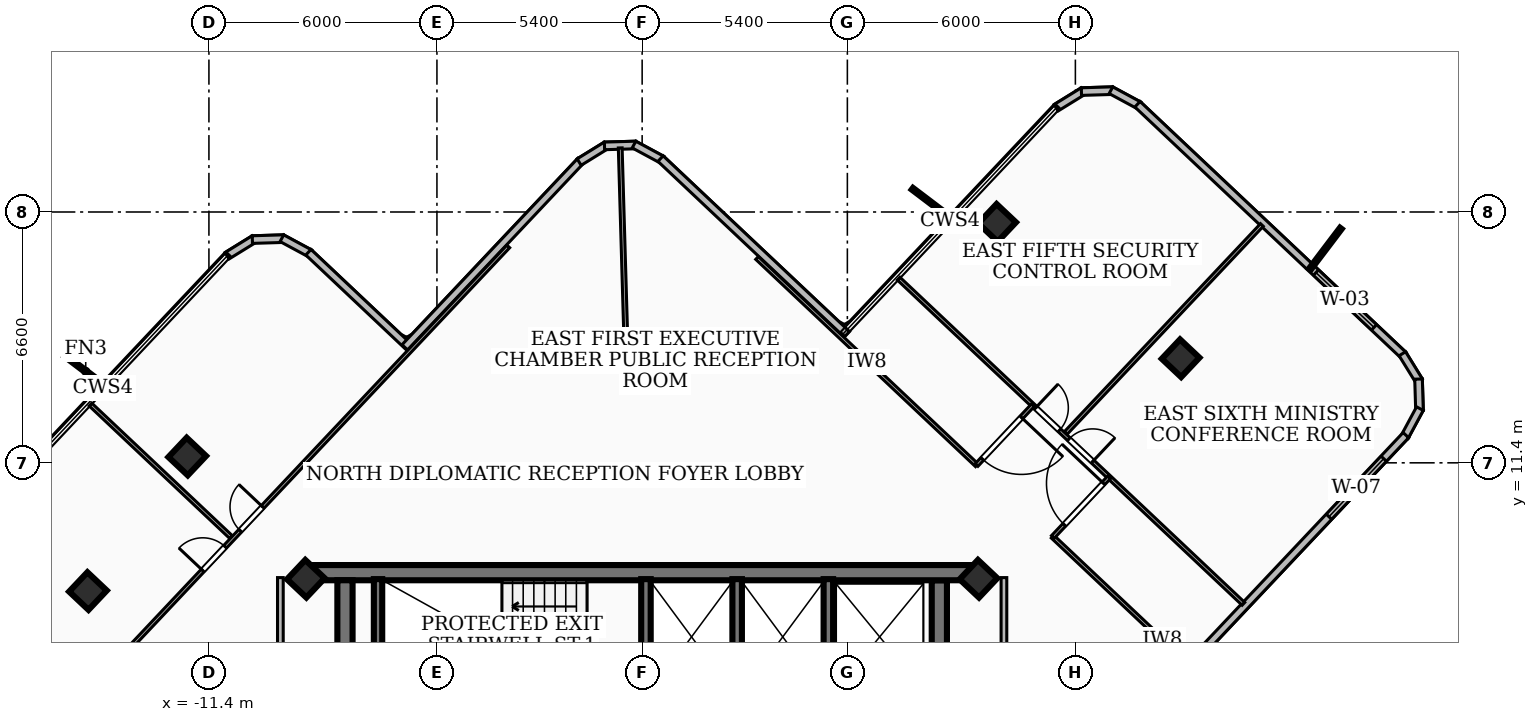
"""IFC4 building model, lengths in metres.
Left out: names, types, materials, properties, quantities, classifications, styles, units other than length and angle.
Written with IfcOpenShell. Run it as: python <this file> out.ifc"""

import sys

from ifc_helpers import new_model, si_unit, direction, frame, frame_2d, origin, origin_2d, place, context, subcontext, project, spatial, rectangle, extrude, element, fill, save


model = new_model("IFC4")
c1 = context("Model", 3, precision=1e-05, world=origin(), true_north=direction((0.0, 1.0)))
c2 = subcontext(c1, "Body", "Model", "MODEL_VIEW")
j1 = project(units=[si_unit("LENGTHUNIT", "METRE"), si_unit("PLANEANGLEUNIT", "RADIAN")], contexts=[c1])
p1 = place(None, origin())
s1 = spatial("IfcSite", under=j1, at=p1, CompositionType="ELEMENT")
p2 = place(p1, origin())
s2 = spatial("IfcBuilding", under=s1, at=p2, CompositionType="ELEMENT")
p3 = place(p2, frame((0.0, 0.0, 247.5)))
s3 = spatial("IfcBuildingStorey", under=s2, at=p3, CompositionType="ELEMENT", Elevation=247.5)
p4 = place(p3, frame((-8.78, 8.51, 0.0), z_axis=(0.0, 0.0, 1.0), x_axis=(1.0, 0.0, 0.0)))
e1 = element("IfcWall", 1, at=p4, inside=s3, PredefinedType="SHEAR", context=c2, shape_type="SweptSolid", body=[
    extrude(rectangle(XDim=17.56, YDim=0.4, at=frame_2d((8.78, 0.0))), origin(), (0.0, 0.0, 1.0), 3.16),
])
for number, where, z_axis, x_axis in (
    (2, (-7.82, 1.95, 0.0), (0.0, 0.0, 1.0), (0.0, 1.0, 0.0)),
    (3, (7.82, 8.31, 0.0), (0.0, 0.0, 1.0), (0.0, -1.0, 0.0)),
):
    element("IfcWall", number, at=place(p3, frame(where, z_axis=z_axis, x_axis=x_axis)), inside=s3, PredefinedType="SHEAR", context=c2, shape_type="SweptSolid", body=[
        extrude(rectangle(XDim=6.36, YDim=0.4, at=frame_2d((3.18, 0.0))), origin(), (0.0, 0.0, 1.0), 3.16),
    ])
p5 = place(p3, frame((-6.95, 5.28, 0.0), z_axis=(0.0, 0.0, 1.0), x_axis=(0.0, 1.0, 0.0)))
e4 = element("IfcWall", 4, at=p5, inside=s3, PredefinedType="SOLIDWALL", context=c2, shape_type="SweptSolid", body=[
    extrude(rectangle(XDim=3.06, YDim=0.22, at=frame_2d((1.53, 0.0))), origin(), (0.0, 0.0, 1.0), 3.16),
])
for number, where, z_axis, x_axis in (
    (5, (0.1, 5.3, 0.0), (0.0, 0.0, 1.0), (0.0, 1.0, 0.0)),
    (6, (2.5, 5.3, 0.0), (0.0, 0.0, 1.0), (0.0, 1.0, 0.0)),
    (7, (4.9, 5.3, 0.0), (0.0, 0.0, 1.0), (0.0, 1.0, 0.0)),
):
    element("IfcWall", number, at=place(p3, frame(where, z_axis=z_axis, x_axis=x_axis)), inside=s3, PredefinedType="SOLIDWALL", context=c2, shape_type="SweptSolid", body=[
        extrude(rectangle(XDim=3.04, YDim=0.25, at=frame_2d((1.52, 0.0))), origin(), (0.0, 0.0, 1.0), 3.16),
    ])
for number, where, z_axis, x_axis in (
    (8, (-8.85, 8.35, 0.0), (0.0, 0.0, 1.0), (0.686, 0.728, 0.0)),
    (9, (8.85, 8.35, 0.0), (0.0, 0.0, 1.0), (0.686, 0.728, 0.0)),
    (10, (14.169, 14.152, 0.0), (0.0, 0.0, 1.0), (0.686, 0.728, 0.0)),
    (11, (9.341, 17.714, 0.0), (0.0, 0.0, 1.0), (0.686, 0.728, 0.0)),
    (12, (-11.971, 11.566, 0.0), (0.0, 0.0, 1.0), (0.686, 0.728, 0.0)),
    (13, (-14.583, 8.026, 0.0), (0.0, 0.0, 1.0), (0.686, 0.728, 0.0)),
):
    element("IfcColumn", number, at=place(p3, frame(where, z_axis=z_axis, x_axis=x_axis)), inside=s3, PredefinedType="COLUMN", context=c2, shape_type="SweptSolid", body=[
        extrude(rectangle(XDim=0.7, YDim=0.7, at=origin_2d()), origin(), (0.0, 0.0, 1.0), 3.42),
    ])
p6 = place(p3, frame((-14.778, 5.275, 0.0), z_axis=(0.0, 0.0, 1.0), x_axis=(-0.727262285553, 0.686359649172, 0.0)))
e14 = element("IfcWall", 14, at=p6, inside=s3, PredefinedType="SOLIDWALL", context=c2, shape_type="SweptSolid", body=[
    extrude(rectangle(XDim=3.641, YDim=0.2, at=frame_2d((1.82, 0.0))), origin(), (0.0, 0.0, 1.0), 3.16),
])
p7 = place(p3, frame((-10.924, 16.848, 0.0), z_axis=(0.0, 0.0, 1.0), x_axis=(0.850947362812, 0.525250974033, 0.0)))
e15 = element("IfcWall", 15, at=p7, inside=s3, PredefinedType="SOLIDWALL", context=c2, shape_type="SweptSolid", body=[
    extrude(rectangle(XDim=0.838, YDim=0.2, at=frame_2d((0.419, 0.0))), origin(), (0.0, 0.0, 1.0), 3.16),
])
p8 = place(p3, frame((-10.257, 17.274, 0.0), z_axis=(0.0, 0.0, 1.0), x_axis=(0.999534635062, 0.03050431627, 0.0)))
e16 = element("IfcWall", 16, at=p8, inside=s3, PredefinedType="SOLIDWALL", context=c2, shape_type="SweptSolid", body=[
    extrude(rectangle(XDim=0.824, YDim=0.2, at=frame_2d((0.412, 0.0))), origin(), (0.0, 0.0, 1.0), 3.16),
])
p9 = place(p3, frame((-9.48, 17.31, 0.0), z_axis=(0.0, 0.0, 1.0), x_axis=(0.880199822755, -0.474603278561, 0.0)))
e17 = element("IfcWall", 17, at=p9, inside=s3, PredefinedType="SOLIDWALL", context=c2, shape_type="SweptSolid", body=[
    extrude(rectangle(XDim=0.838, YDim=0.2, at=frame_2d((0.419, 0.0))), origin(), (0.0, 0.0, 1.0), 3.16),
])
p10 = place(p3, frame((-8.782, 16.941, 0.0), z_axis=(0.0, 0.0, 1.0), x_axis=(0.727388601412, -0.686225781019, 0.0)))
e18 = element("IfcWall", 18, at=p10, inside=s3, PredefinedType="SOLIDWALL", context=c2, shape_type="SweptSolid", body=[
    extrude(rectangle(XDim=3.642, YDim=0.2, at=frame_2d((1.821, 0.0))), origin(), (0.0, 0.0, 1.0), 3.16),
])
p11 = place(p3, frame((-6.246, 14.439, 0.0), z_axis=(0.0, 0.0, 1.0), x_axis=(0.686109803758, 0.727497998064, 0.0)))
e19 = element("IfcWall", 19, at=p11, inside=s3, PredefinedType="SOLIDWALL", context=c2, shape_type="SweptSolid", body=[
    extrude(rectangle(XDim=6.742, YDim=0.2, at=frame_2d((3.371, 0.0))), origin(), (0.0, 0.0, 1.0), 3.16),
])
p12 = place(p3, frame((-1.658, 19.313, 0.0), z_axis=(0.0, 0.0, 1.0), x_axis=(0.850997215859, 0.52517019965, 0.0)))
e20 = element("IfcWall", 20, at=p12, inside=s3, PredefinedType="SOLIDWALL", context=c2, shape_type="SweptSolid", body=[
    extrude(rectangle(XDim=0.838, YDim=0.2, at=frame_2d((0.419, 0.0))), origin(), (0.0, 0.0, 1.0), 3.16),
])
p13 = place(p3, frame((-0.991, 19.739, 0.0), z_axis=(0.0, 0.0, 1.0), x_axis=(0.999578691641, 0.029024803491, 0.0)))
e21 = element("IfcWall", 21, at=p13, inside=s3, PredefinedType="SOLIDWALL", context=c2, shape_type="SweptSolid", body=[
    extrude(rectangle(XDim=0.824, YDim=0.2, at=frame_2d((0.412, 0.0))), origin(), (0.0, 0.0, 1.0), 3.16),
])
p14 = place(p3, frame((-0.214, 19.774, 0.0), z_axis=(0.0, 0.0, 1.0), x_axis=(0.880199822755, -0.474603278561, 0.0)))
e22 = element("IfcWall", 22, at=p14, inside=s3, PredefinedType="SOLIDWALL", context=c2, shape_type="SweptSolid", body=[
    extrude(rectangle(XDim=0.838, YDim=0.2, at=frame_2d((0.419, 0.0))), origin(), (0.0, 0.0, 1.0), 3.16),
])
p15 = place(p3, frame((0.484, 19.405, 0.0), z_axis=(0.0, 0.0, 1.0), x_axis=(0.727574426042, -0.686028756372, 0.0)))
e23 = element("IfcWall", 23, at=p15, inside=s3, PredefinedType="SOLIDWALL", context=c2, shape_type="SweptSolid", body=[
    extrude(rectangle(XDim=6.74, YDim=0.2, at=frame_2d((3.37, 0.0))), origin(), (0.0, 0.0, 1.0), 3.16),
])
p16 = place(p3, frame((10.892, 20.742, 0.0), z_axis=(0.0, 0.0, 1.0), x_axis=(0.850997215859, 0.52517019965, 0.0)))
e24 = element("IfcWall", 24, at=p16, inside=s3, PredefinedType="SOLIDWALL", context=c2, shape_type="SweptSolid", body=[
    extrude(rectangle(XDim=0.838, YDim=0.2, at=frame_2d((0.419, 0.0))), origin(), (0.0, 0.0, 1.0), 3.16),
])
p17 = place(p3, frame((11.559, 21.168, 0.0), z_axis=(0.0, 0.0, 1.0), x_axis=(0.999534635062, 0.03050431627, 0.0)))
e25 = element("IfcWall", 25, at=p17, inside=s3, PredefinedType="SOLIDWALL", context=c2, shape_type="SweptSolid", body=[
    extrude(rectangle(XDim=0.824, YDim=0.2, at=frame_2d((0.412, 0.0))), origin(), (0.0, 0.0, 1.0), 3.16),
])
p18 = place(p3, frame((12.336, 21.204, 0.0), z_axis=(0.0, 0.0, 1.0), x_axis=(0.880078176624, -0.474828814447, 0.0)))
e26 = element("IfcWall", 26, at=p18, inside=s3, PredefinedType="SOLIDWALL", context=c2, shape_type="SweptSolid", body=[
    extrude(rectangle(XDim=0.839, YDim=0.2, at=frame_2d((0.419, 0.0))), origin(), (0.0, 0.0, 1.0), 3.16),
])
p19 = place(p3, frame((13.034, 20.835, 0.0), z_axis=(0.0, 0.0, 1.0), x_axis=(0.727480137234, -0.686128741513, 0.0)))
e27 = element("IfcWall", 27, at=p19, inside=s3, PredefinedType="SOLIDWALL", context=c2, shape_type="SweptSolid", body=[
    extrude(rectangle(XDim=9.624, YDim=0.2, at=frame_2d((4.812, 0.0))), origin(), (0.0, 0.0, 1.0), 3.16),
])
p20 = place(p19, frame((6.456, 0.0, 0.85)))
e28 = element("IfcOpeningElement", 28, at=p20, cuts=e27, PredefinedType="OPENING", context=c2, shape_type="SweptSolid", body=[
    extrude(rectangle(XDim=2.1, YDim=2.0, at=frame_2d((1.05, 1.0))), frame((0.0, 0.11, 0.0), z_axis=(0.0, -1.0, 0.0), x_axis=(1.0, 0.0, 0.0)), (0.0, 0.0, 1.0), 0.22),
])
p21 = place(p3, frame((20.004, 14.27, 0.0), z_axis=(0.0, 0.0, 1.0), x_axis=(0.525902672248, -0.85054475445, 0.0)))
e29 = element("IfcWall", 29, at=p21, inside=s3, PredefinedType="SOLIDWALL", context=c2, shape_type="SweptSolid", body=[
    extrude(rectangle(XDim=0.837, YDim=0.2, at=frame_2d((0.418, 0.0))), origin(), (0.0, 0.0, 1.0), 3.16),
])
p22 = place(p3, frame((20.43, 13.604, 0.0), z_axis=(0.0, 0.0, 1.0), x_axis=(0.030468239346, -0.999535735425, 0.0)))
e30 = element("IfcWall", 30, at=p22, inside=s3, PredefinedType="SOLIDWALL", context=c2, shape_type="SweptSolid", body=[
    extrude(rectangle(XDim=0.825, YDim=0.2, at=frame_2d((0.413, 0.0))), origin(), (0.0, 0.0, 1.0), 3.16),
])
p23 = place(p3, frame((20.466, 12.826, 0.0), z_axis=(0.0, 0.0, 1.0), x_axis=(-0.474603278561, -0.880199822755, 0.0)))
e31 = element("IfcWall", 31, at=p23, inside=s3, PredefinedType="SOLIDWALL", context=c2, shape_type="SweptSolid", body=[
    extrude(rectangle(XDim=0.838, YDim=0.2, at=frame_2d((0.419, 0.0))), origin(), (0.0, 0.0, 1.0), 3.16),
])
p24 = place(p3, frame((20.097, 12.128, 0.0), z_axis=(0.0, 0.0, 1.0), x_axis=(-0.686187598971, -0.72742462085, 0.0)))
e32 = element("IfcWall", 32, at=p24, inside=s3, PredefinedType="SOLIDWALL", context=c2, shape_type="SweptSolid", body=[
    extrude(rectangle(XDim=8.241, YDim=0.2, at=frame_2d((4.121, 0.0))), origin(), (0.0, 0.0, 1.0), 3.16),
])
p25 = place(p24, frame((0.85, 0.0, 0.85)))
e33 = element("IfcOpeningElement", 33, at=p25, cuts=e32, PredefinedType="OPENING", context=c2, shape_type="SweptSolid", body=[
    extrude(rectangle(XDim=2.1, YDim=1.8, at=frame_2d((1.05, 0.9))), frame((0.0, 0.11, 0.0), z_axis=(0.0, -1.0, 0.0), x_axis=(1.0, 0.0, 0.0)), (0.0, 0.0, 1.0), 0.22),
])
p26 = place(p3, frame((-9.52, 1.75, 0.0), z_axis=(0.0, 0.0, 1.0), x_axis=(0.0, 1.0, 0.0)))
e34 = element("IfcWall", 34, at=p26, inside=s3, PredefinedType="PARTITIONING", context=c2, shape_type="SweptSolid", body=[
    extrude(rectangle(XDim=6.63, YDim=0.15, at=frame_2d((3.315, 0.0))), origin(), (0.0, 0.0, 1.0), 2.53),
])
p27 = place(p3, frame((9.52, 1.75, 0.0), z_axis=(0.0, 0.0, 1.0), x_axis=(0.0, 1.0, 0.0)))
e35 = element("IfcWall", 35, at=p27, inside=s3, PredefinedType="PARTITIONING", context=c2, shape_type="SweptSolid", body=[
    extrude(rectangle(XDim=6.63, YDim=0.15, at=frame_2d((3.315, 0.0))), origin(), (0.0, 0.0, 1.0), 3.16),
])
p28 = place(p3, frame((-0.397, 13.54, 0.0), z_axis=(0.0, 0.0, 1.0), x_axis=(-0.029263699144, 0.999571726247, 0.0)))
e36 = element("IfcWall", 36, at=p28, inside=s3, PredefinedType="PARTITIONING", context=c2, shape_type="SweptSolid", body=[
    extrude(rectangle(XDim=6.149, YDim=0.1, at=frame_2d((3.074, 0.0))), origin(), (0.0, 0.0, 1.0), 3.16),
])
p29 = place(p3, frame((8.807, 11.336, 0.0), z_axis=(0.0, 0.0, 1.0), x_axis=(-0.727546923281, 0.68605792352, 0.0)))
e37 = element("IfcWall", 37, at=p29, inside=s3, PredefinedType="PARTITIONING", context=c2, shape_type="SweptSolid", body=[
    extrude(rectangle(XDim=7.95, YDim=0.1, at=frame_2d((3.975, 0.0))), origin(), (0.0, 0.0, 1.0), 3.16),
])
p30 = place(p3, frame((16.585, 4.002, 0.0), z_axis=(0.0, 0.0, 1.0), x_axis=(-0.727485611578, 0.686122937196, 0.0)))
e38 = element("IfcWall", 38, at=p30, inside=s3, PredefinedType="PARTITIONING", context=c2, shape_type="SweptSolid", body=[
    extrude(rectangle(XDim=7.951, YDim=0.1, at=frame_2d((3.975, 0.0))), origin(), (0.0, 0.0, 1.0), 3.16),
])
p31 = place(p3, frame((10.282, 12.915, 0.0), z_axis=(0.0, 0.0, 1.0), x_axis=(-0.685949623464, -0.727649032205, 0.0)))
e39 = element("IfcWall", 39, at=p31, inside=s3, PredefinedType="PARTITIONING", context=c2, shape_type="SweptSolid", body=[
    extrude(rectangle(XDim=2.16, YDim=0.1, at=frame_2d((1.08, 0.0))), origin(), (0.0, 0.0, 1.0), 2.53),
])
p32 = place(p31, frame((0.44, 0.0, 0.0)))
e40 = element("IfcOpeningElement", 40, at=p32, cuts=e39, PredefinedType="OPENING", context=c2, shape_type="SweptSolid", body=[
    extrude(rectangle(XDim=1.5, YDim=2.12, at=frame_2d((0.75, 1.06))), frame((0.0, 0.06, 0.0), z_axis=(0.0, -1.0, 0.0), x_axis=(1.0, 0.0, 0.0)), (0.0, 0.0, 1.0), 0.12),
])
p33 = place(p3, frame((10.808, 9.45, 0.0), z_axis=(0.0, 0.0, 1.0), x_axis=(0.686175284747, 0.727436236795, 0.0)))
e41 = element("IfcWall", 41, at=p33, inside=s3, PredefinedType="PARTITIONING", context=c2, shape_type="SweptSolid", body=[
    extrude(rectangle(XDim=2.16, YDim=0.1, at=frame_2d((1.08, 0.0))), origin(), (0.0, 0.0, 1.0), 3.16),
])
p34 = place(p33, frame((0.44, 0.0, 0.0)))
e42 = element("IfcOpeningElement", 42, at=p34, cuts=e41, PredefinedType="OPENING", context=c2, shape_type="SweptSolid", body=[
    extrude(rectangle(XDim=1.5, YDim=2.12, at=frame_2d((0.75, 1.06))), frame((0.0, 0.06, 0.0), z_axis=(0.0, -1.0, 0.0), x_axis=(1.0, 0.0, 0.0)), (0.0, 0.0, 1.0), 0.12),
])
p35 = place(p3, frame((11.145, 12.183, 0.0), z_axis=(0.0, 0.0, 1.0), x_axis=(0.686088923395, 0.727517689953, 0.0)))
e43 = element("IfcWall", 43, at=p35, inside=s3, PredefinedType="PARTITIONING", context=c2, shape_type="SweptSolid", body=[
    extrude(rectangle(XDim=7.525, YDim=0.1, at=frame_2d((3.763, 0.0))), origin(), (0.0, 0.0, 1.0), 3.16),
])
p36 = place(p3, frame((6.75, 16.246, 0.0), z_axis=(0.0, 0.0, 1.0), x_axis=(0.727488049341, -0.686120352464, 0.0)))
e44 = element("IfcWall", 44, at=p36, inside=s3, PredefinedType="PARTITIONING", context=c2, shape_type="SweptSolid", body=[
    extrude(rectangle(XDim=12.47, YDim=0.1, at=frame_2d((6.235, 0.0))), origin(), (0.0, 0.0, 1.0), 2.53),
])
p37 = place(p36, frame((6.155, 0.0, 0.0)))
e45 = element("IfcOpeningElement", 45, at=p37, cuts=e44, PredefinedType="OPENING", context=c2, shape_type="SweptSolid", body=[
    extrude(rectangle(XDim=0.86, YDim=2.04, at=frame_2d((0.43, 1.02))), frame((0.0, 0.06, 0.0), z_axis=(0.0, -1.0, 0.0), x_axis=(1.0, 0.0, 0.0)), (0.0, 0.0, 1.0), 0.12),
])
p38 = place(p36, frame((4.955, 0.0, 0.0)))
e46 = element("IfcOpeningElement", 46, at=p38, cuts=e44, PredefinedType="OPENING", context=c2, shape_type="SweptSolid", body=[
    extrude(rectangle(XDim=0.86, YDim=2.04, at=frame_2d((0.43, 1.02))), frame((0.0, 0.06, 0.0), z_axis=(0.0, -1.0, 0.0), x_axis=(1.0, 0.0, 0.0)), (0.0, 0.0, 1.0), 0.12),
])
p39 = place(p3, frame((-10.817, 9.445, 0.0), z_axis=(0.0, 0.0, 1.0), x_axis=(-0.727564075469, 0.686039733606, 0.0)))
e47 = element("IfcWall", 47, at=p39, inside=s3, PredefinedType="PARTITIONING", context=c2, shape_type="SweptSolid", body=[
    extrude(rectangle(XDim=5.086, YDim=0.1, at=frame_2d((2.543, 0.0))), origin(), (0.0, 0.0, 1.0), 3.16),
])
p40 = place(p3, frame((-17.271, 2.514, 0.0), z_axis=(0.0, 0.0, 1.0), x_axis=(0.686068145865, 0.727537283739, 0.0)))
e48 = element("IfcWall", 48, at=p40, inside=s3, PredefinedType="PARTITIONING", context=c2, shape_type="SweptSolid", body=[
    extrude(rectangle(XDim=20.04, YDim=0.1, at=frame_2d((10.02, 0.0))), origin(), (0.0, 0.0, 1.0), 2.53),
])
p41 = place(p40, frame((9.76, 0.0, 0.0)))
e49 = element("IfcOpeningElement", 49, at=p41, cuts=e48, PredefinedType="OPENING", context=c2, shape_type="SweptSolid", body=[
    extrude(rectangle(XDim=0.86, YDim=2.04, at=frame_2d((0.43, 1.02))), frame((0.0, 0.06, 0.0), z_axis=(0.0, -1.0, 0.0), x_axis=(1.0, 0.0, 0.0)), (0.0, 0.0, 1.0), 0.12),
])
p42 = place(p40, frame((8.32, 0.0, 0.0)))
e50 = element("IfcOpeningElement", 50, at=p42, cuts=e48, PredefinedType="OPENING", context=c2, shape_type="SweptSolid", body=[
    extrude(rectangle(XDim=0.86, YDim=2.04, at=frame_2d((0.43, 1.02))), frame((0.0, 0.06, 0.0), z_axis=(0.0, -1.0, 0.0), x_axis=(1.0, 0.0, 0.0)), (0.0, 0.0, 1.0), 0.12),
])
p43 = place(p20, origin())
e51 = element("IfcWindow", 51, at=p43, inside=s3, PartitioningType="SINGLE_PANEL", PredefinedType="WINDOW", context=c2, shape_type="SweptSolid", body=[
    extrude(rectangle(XDim=2.1, YDim=2.0, at=frame_2d((1.05, 1.0))), frame((0.0, 0.03, 0.0), z_axis=(0.0, -1.0, 0.0), x_axis=(1.0, 0.0, 0.0)), (0.0, 0.0, 1.0), 0.06),
])
fill(e28, e51)
p44 = place(p25, origin())
e52 = element("IfcWindow", 52, at=p44, inside=s3, PartitioningType="SINGLE_PANEL", PredefinedType="WINDOW", context=c2, shape_type="SweptSolid", body=[
    extrude(rectangle(XDim=2.1, YDim=1.8, at=frame_2d((1.05, 0.9))), frame((0.0, 0.03, 0.0), z_axis=(0.0, -1.0, 0.0), x_axis=(1.0, 0.0, 0.0)), (0.0, 0.0, 1.0), 0.06),
])
fill(e33, e52)
p45 = place(p32, origin())
e53 = element("IfcDoor", 53, at=p45, inside=s3, OperationType="SINGLE_SWING_LEFT", PredefinedType="DOOR", context=c2, shape_type="SweptSolid", body=[
    extrude(rectangle(XDim=1.5, YDim=2.12, at=frame_2d((0.75, 1.06))), frame((0.0, 0.025, 0.0), z_axis=(0.0, -1.0, 0.0), x_axis=(1.0, 0.0, 0.0)), (0.0, 0.0, 1.0), 0.05),
])
fill(e40, e53)
p46 = place(p34, origin())
e54 = element("IfcDoor", 54, at=p46, inside=s3, OperationType="SINGLE_SWING_RIGHT", PredefinedType="DOOR", context=c2, shape_type="SweptSolid", body=[
    extrude(rectangle(XDim=1.5, YDim=2.12, at=frame_2d((0.75, 1.06))), frame((0.0, 0.025, 0.0), z_axis=(0.0, -1.0, 0.0), x_axis=(1.0, 0.0, 0.0)), (0.0, 0.0, 1.0), 0.05),
])
fill(e42, e54)
p47 = place(p37, origin())
e55 = element("IfcDoor", 55, at=p47, inside=s3, OperationType="SINGLE_SWING_RIGHT", PredefinedType="DOOR", context=c2, shape_type="SweptSolid", body=[
    extrude(rectangle(XDim=0.86, YDim=2.04, at=frame_2d((0.43, 1.02))), frame((0.0, 0.025, 0.0), z_axis=(0.0, -1.0, 0.0), x_axis=(1.0, 0.0, 0.0)), (0.0, 0.0, 1.0), 0.05),
])
fill(e45, e55)
p48 = place(p38, origin())
e56 = element("IfcDoor", 56, at=p48, inside=s3, OperationType="SINGLE_SWING_LEFT", PredefinedType="DOOR", context=c2, shape_type="SweptSolid", body=[
    extrude(rectangle(XDim=0.86, YDim=2.04, at=frame_2d((0.43, 1.02))), frame((0.0, 0.025, 0.0), z_axis=(0.0, -1.0, 0.0), x_axis=(1.0, 0.0, 0.0)), (0.0, 0.0, 1.0), 0.05),
])
fill(e46, e56)
p49 = place(p41, origin())
e57 = element("IfcDoor", 57, at=p49, inside=s3, OperationType="SINGLE_SWING_RIGHT", PredefinedType="DOOR", context=c2, shape_type="SweptSolid", body=[
    extrude(rectangle(XDim=0.86, YDim=2.04, at=frame_2d((0.43, 1.02))), frame((0.0, 0.025, 0.0), z_axis=(0.0, -1.0, 0.0), x_axis=(1.0, 0.0, 0.0)), (0.0, 0.0, 1.0), 0.05),
])
fill(e49, e57)
p50 = place(p42, origin())
e58 = element("IfcDoor", 58, at=p50, inside=s3, OperationType="SINGLE_SWING_LEFT", PredefinedType="DOOR", context=c2, shape_type="SweptSolid", body=[
    extrude(rectangle(XDim=0.86, YDim=2.04, at=frame_2d((0.43, 1.02))), frame((0.0, 0.025, 0.0), z_axis=(0.0, -1.0, 0.0), x_axis=(1.0, 0.0, 0.0)), (0.0, 0.0, 1.0), 0.05),
])
fill(e50, e58)
save(model, sys.argv[1])
